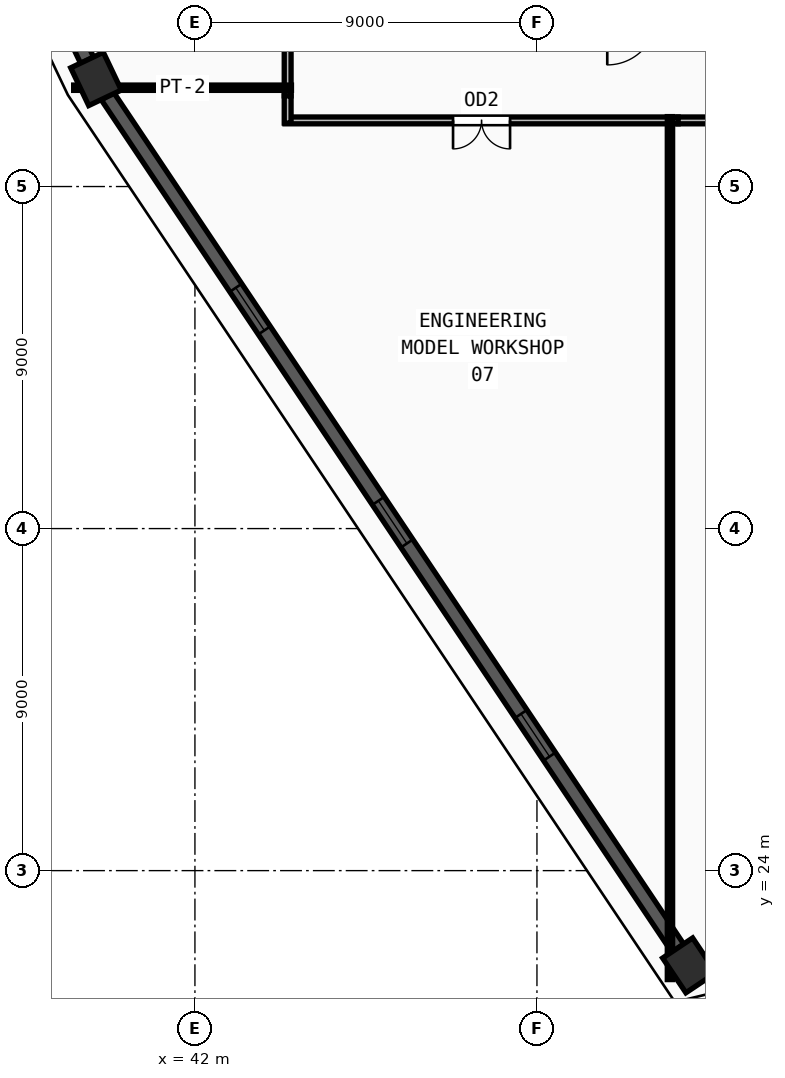
"""IFC4 building model, lengths in metres.
Left out: names, types, materials, properties, quantities, classifications, styles, units other than length and angle.
Written with IfcOpenShell. Run it as: python <this file> out.ifc"""

import sys

from ifc_helpers import new_model, si_unit, direction, frame, frame_2d, origin, origin_2d, place, context, subcontext, project, spatial, rectangle, extrude, source, transform, mapped, element, fill, save


model = new_model("IFC4")
c1 = context("Model", 3, precision=1e-05, world=origin(), true_north=direction((0.0, 1.0)))
c2 = subcontext(c1, "Body", "Model", "MODEL_VIEW")
j1 = project(units=[si_unit("LENGTHUNIT", "METRE"), si_unit("PLANEANGLEUNIT", "RADIAN")], contexts=[c1])
p1 = place(None, origin())
s1 = spatial("IfcSite", under=j1, at=p1, CompositionType="ELEMENT")
p2 = place(p1, origin())
s2 = spatial("IfcBuilding", under=s1, at=p2, CompositionType="ELEMENT")
p3 = place(p2, frame((0.0, 0.0, 286.5)))
s3 = spatial("IfcBuildingStorey", under=s2, at=p3, CompositionType="ELEMENT", Elevation=286.5)
m1 = source(origin(), c2, "Body", "SweptSolid", [
    extrude(rectangle(XDim=1.1, YDim=0.95, at=origin_2d()), origin(), (0.0, 0.0, 1.0), 3.75),
])
for number, where, z_axis, x_axis in (
    (1, (55.008, 21.507, 0.0), (0.0, 0.0, 1.0), (-0.556, 0.831, 0.0)),
    (2, (39.397, 44.831, 0.0), (0.0, 0.0, 1.0), (-0.43, 0.903, 0.0)),
):
    element("IfcColumn", number, at=place(p3, frame(where, z_axis=z_axis, x_axis=x_axis)), inside=s3, PredefinedType="COLUMN", context=c2, shape_type="MappedRepresentation", body=[
        mapped(m1, transform((0.0, 0.0, 0.0), x_axis=(1.0, 0.0, 0.0), y_axis=(0.0, 1.0, 0.0), z_axis=(0.0, 0.0, 1.0), scale=1.0)),
    ])
p4 = place(p3, frame((29.59, 65.429, 0.0), z_axis=(0.0, 0.0, 1.0), x_axis=(0.429890605998, -0.902880981567, 0.0)))
e3 = element("IfcWall", 3, at=p4, inside=s3, PredefinedType="SOLIDWALL", context=c2, shape_type="SweptSolid", body=[
    extrude(rectangle(XDim=22.273, YDim=0.38, at=frame_2d((11.136, 0.0))), origin(), (0.0, 0.0, 1.0), 3.57),
])
m2 = source(origin(), c2, "Body", "SweptSolid", [
    extrude(rectangle(XDim=1.35, YDim=1.85, at=frame_2d((0.675, 0.925))), frame((0.0, 0.2, 0.0), z_axis=(0.0, -1.0, 0.0), x_axis=(1.0, 0.0, 0.0)), (0.0, 0.0, 1.0), 0.4),
])
p5 = place(p4, frame((4.893, 0.0, 0.55)))
e4 = element("IfcOpeningElement", 4, at=p5, cuts=e3, PredefinedType="OPENING", context=c2, shape_type="MappedRepresentation", body=[
    mapped(m2, transform((0.0, 0.0, 0.0), x_axis=(1.0, 0.0, 0.0), y_axis=(0.0, 1.0, 0.0), z_axis=(0.0, 0.0, 1.0), scale=1.0)),
])
p6 = place(p4, frame((10.462, 0.0, 0.55)))
e5 = element("IfcOpeningElement", 5, at=p6, cuts=e3, PredefinedType="OPENING", context=c2, shape_type="MappedRepresentation", body=[
    mapped(m2, transform((0.0, 0.0, 0.0), x_axis=(1.0, 0.0, 0.0), y_axis=(0.0, 1.0, 0.0), z_axis=(0.0, 0.0, 1.0), scale=1.0)),
])
p7 = place(p4, frame((16.03, 0.0, 0.55)))
e6 = element("IfcOpeningElement", 6, at=p7, cuts=e3, PredefinedType="OPENING", context=c2, shape_type="MappedRepresentation", body=[
    mapped(m2, transform((0.0, 0.0, 0.0), x_axis=(1.0, 0.0, 0.0), y_axis=(0.0, 1.0, 0.0), z_axis=(0.0, 0.0, 1.0), scale=1.0)),
])
p8 = place(p3, frame((39.697, 44.382, 0.0), z_axis=(0.0, 0.0, 1.0), x_axis=(0.556246250685, -0.831017514014, 0.0)))
e7 = element("IfcWall", 7, at=p8, inside=s3, PredefinedType="SOLIDWALL", context=c2, shape_type="SweptSolid", body=[
    extrude(rectangle(XDim=26.986, YDim=0.38, at=frame_2d((13.493, 0.0))), origin(), (0.0, 0.0, 1.0), 3.57),
])
p9 = place(p8, frame((6.072, 0.0, 0.55)))
e8 = element("IfcOpeningElement", 8, at=p9, cuts=e7, PredefinedType="OPENING", context=c2, shape_type="MappedRepresentation", body=[
    mapped(m2, transform((0.0, 0.0, 0.0), x_axis=(1.0, 0.0, 0.0), y_axis=(0.0, 1.0, 0.0), z_axis=(0.0, 0.0, 1.0), scale=1.0)),
])
p10 = place(p8, frame((12.818, 0.0, 0.55)))
e9 = element("IfcOpeningElement", 9, at=p10, cuts=e7, PredefinedType="OPENING", context=c2, shape_type="MappedRepresentation", body=[
    mapped(m2, transform((0.0, 0.0, 0.0), x_axis=(1.0, 0.0, 0.0), y_axis=(0.0, 1.0, 0.0), z_axis=(0.0, 0.0, 1.0), scale=1.0)),
])
p11 = place(p8, frame((19.565, 0.0, 0.55)))
e10 = element("IfcOpeningElement", 10, at=p11, cuts=e7, PredefinedType="OPENING", context=c2, shape_type="MappedRepresentation", body=[
    mapped(m2, transform((0.0, 0.0, 0.0), x_axis=(1.0, 0.0, 0.0), y_axis=(0.0, 1.0, 0.0), z_axis=(0.0, 0.0, 1.0), scale=1.0)),
])
p12 = place(p3, frame((44.44, 44.385, 0.0), z_axis=(0.0, 0.0, 1.0), x_axis=(0.0, 1.0, 0.0)))
e11 = element("IfcWall", 11, at=p12, inside=s3, PredefinedType="PARTITIONING", context=c2, shape_type="SweptSolid", body=[
    extrude(rectangle(XDim=7.9, YDim=0.18, at=frame_2d((3.95, 0.0))), origin(), (0.0, 0.0, 1.0), 3.57),
])
m3 = source(origin(), c2, "Body", "SweptSolid", [
    extrude(rectangle(XDim=1.0, YDim=2.2, at=frame_2d((0.5, 1.1))), frame((0.0, 0.1, 0.0), z_axis=(0.0, -1.0, 0.0), x_axis=(1.0, 0.0, 0.0)), (0.0, 0.0, 1.0), 0.2),
])
p13 = place(p12, frame((3.45, 0.0, 0.0)))
e12 = element("IfcOpeningElement", 12, at=p13, cuts=e11, PredefinedType="OPENING", context=c2, shape_type="MappedRepresentation", body=[
    mapped(m3, transform((0.0, 0.0, 0.0), x_axis=(1.0, 0.0, 0.0), y_axis=(0.0, 1.0, 0.0), z_axis=(0.0, 0.0, 1.0), scale=1.0)),
])
p14 = place(p3, frame((54.715, 43.74, 0.0), z_axis=(0.0, 0.0, 1.0), x_axis=(-1.0, 0.0, 0.0)))
e13 = element("IfcWall", 13, at=p14, inside=s3, PredefinedType="PARTITIONING", context=c2, shape_type="SweptSolid", body=[
    extrude(rectangle(XDim=10.345, YDim=0.18, at=frame_2d((5.172, 0.0))), origin(), (0.0, 0.0, 1.0), 3.57),
])
m4 = source(origin(), c2, "Body", "SweptSolid", [
    extrude(rectangle(XDim=1.5, YDim=2.2, at=frame_2d((0.75, 1.1))), frame((0.0, 0.1, 0.0), z_axis=(0.0, -1.0, 0.0), x_axis=(1.0, 0.0, 0.0)), (0.0, 0.0, 1.0), 0.2),
])
p15 = place(p14, frame((4.423, 0.0, 0.0)))
e14 = element("IfcOpeningElement", 14, at=p15, cuts=e13, PredefinedType="OPENING", context=c2, shape_type="MappedRepresentation", body=[
    mapped(m4, transform((0.0, 0.0, 0.0), x_axis=(1.0, 0.0, 0.0), y_axis=(0.0, 1.0, 0.0), z_axis=(0.0, 0.0, 1.0), scale=1.0)),
])
p16 = place(p3, frame((75.63, 43.74, 0.0), z_axis=(0.0, 0.0, 1.0), x_axis=(-1.0, 0.0, 0.0)))
e15 = element("IfcWall", 15, at=p16, inside=s3, PredefinedType="PARTITIONING", context=c2, shape_type="SweptSolid", body=[
    extrude(rectangle(XDim=20.915, YDim=0.18, at=frame_2d((10.458, 0.0))), origin(), (0.0, 0.0, 1.0), 3.57),
])
p17 = place(p16, frame((9.707, 0.0, 0.0)))
e16 = element("IfcOpeningElement", 16, at=p17, cuts=e15, PredefinedType="OPENING", context=c2, shape_type="MappedRepresentation", body=[
    mapped(m4, transform((0.0, 0.0, 0.0), x_axis=(1.0, 0.0, 0.0), y_axis=(0.0, 1.0, 0.0), z_axis=(0.0, 0.0, 1.0), scale=1.0)),
])
p18 = place(p3, frame((44.44, 43.67, 0.0), z_axis=(0.0, 0.0, 1.0), x_axis=(0.0, 1.0, 0.0)))
e17 = element("IfcWall", 17, at=p18, inside=s3, PredefinedType="PARTITIONING", context=c2, shape_type="SweptSolid", body=[
    extrude(rectangle(XDim=0.715, YDim=0.18, at=frame_2d((0.357, 0.0))), origin(), (0.0, 0.0, 1.0), 3.57),
])
p19 = place(p3, frame((44.54, 44.6, 0.0), z_axis=(0.0, 0.0, 1.0), x_axis=(-1.0, 0.0, 0.0)))
e18 = element("IfcWall", 18, at=p19, inside=s3, PredefinedType="PARTITIONING", context=c2, shape_type="SweptSolid", body=[
    extrude(rectangle(XDim=5.731, YDim=0.14, at=frame_2d((2.865, 0.0))), origin(), (0.0, 0.0, 1.0), 3.57),
])
p20 = place(p3, frame((54.5, 43.84, 0.0), z_axis=(0.0, 0.0, 1.0), x_axis=(0.0, -1.0, 0.0)))
e19 = element("IfcWall", 19, at=p20, inside=s3, PredefinedType="PARTITIONING", context=c2, shape_type="SweptSolid", body=[
    extrude(rectangle(XDim=22.707, YDim=0.14, at=frame_2d((11.354, 0.0))), origin(), (0.0, 0.0, 1.0), 2.967),
])
m5 = source(origin(), c2, "Body", "SweptSolid", [
    extrude(rectangle(XDim=1.35, YDim=1.85, at=frame_2d((0.675, 0.925))), frame((0.0, 0.03, 0.0), z_axis=(0.0, -1.0, 0.0), x_axis=(1.0, 0.0, 0.0)), (0.0, 0.0, 1.0), 0.06),
])
p21 = place(p9, origin())
e20 = element("IfcWindow", 20, at=p21, inside=s3, PartitioningType="SINGLE_PANEL", PredefinedType="WINDOW", context=c2, shape_type="MappedRepresentation", body=[
    mapped(m5, transform((0.0, 0.0, 0.0), x_axis=(1.0, 0.0, 0.0), y_axis=(0.0, 1.0, 0.0), z_axis=(0.0, 0.0, 1.0), scale=1.0)),
])
fill(e8, e20)
p22 = place(p10, origin())
e21 = element("IfcWindow", 21, at=p22, inside=s3, PartitioningType="SINGLE_PANEL", PredefinedType="WINDOW", context=c2, shape_type="MappedRepresentation", body=[
    mapped(m5, transform((0.0, 0.0, 0.0), x_axis=(1.0, 0.0, 0.0), y_axis=(0.0, 1.0, 0.0), z_axis=(0.0, 0.0, 1.0), scale=1.0)),
])
fill(e9, e21)
p23 = place(p11, origin())
e22 = element("IfcWindow", 22, at=p23, inside=s3, PartitioningType="SINGLE_PANEL", PredefinedType="WINDOW", context=c2, shape_type="MappedRepresentation", body=[
    mapped(m5, transform((0.0, 0.0, 0.0), x_axis=(1.0, 0.0, 0.0), y_axis=(0.0, 1.0, 0.0), z_axis=(0.0, 0.0, 1.0), scale=1.0)),
])
fill(e10, e22)
m6 = source(origin(), c2, "Body", "SweptSolid", [
    extrude(rectangle(XDim=1.5, YDim=2.2, at=frame_2d((0.75, 1.1))), frame((0.0, 0.025, 0.0), z_axis=(0.0, -1.0, 0.0), x_axis=(1.0, 0.0, 0.0)), (0.0, 0.0, 1.0), 0.05),
])
p24 = place(p15, origin())
e23 = element("IfcDoor", 23, at=p24, inside=s3, OperationType="DOUBLE_DOOR_SINGLE_SWING", PredefinedType="DOOR", context=c2, shape_type="MappedRepresentation", body=[
    mapped(m6, transform((0.0, 0.0, 0.0), x_axis=(1.0, 0.0, 0.0), y_axis=(0.0, 1.0, 0.0), z_axis=(0.0, 0.0, 1.0), scale=1.0)),
])
fill(e14, e23)
save(model, sys.argv[1])
